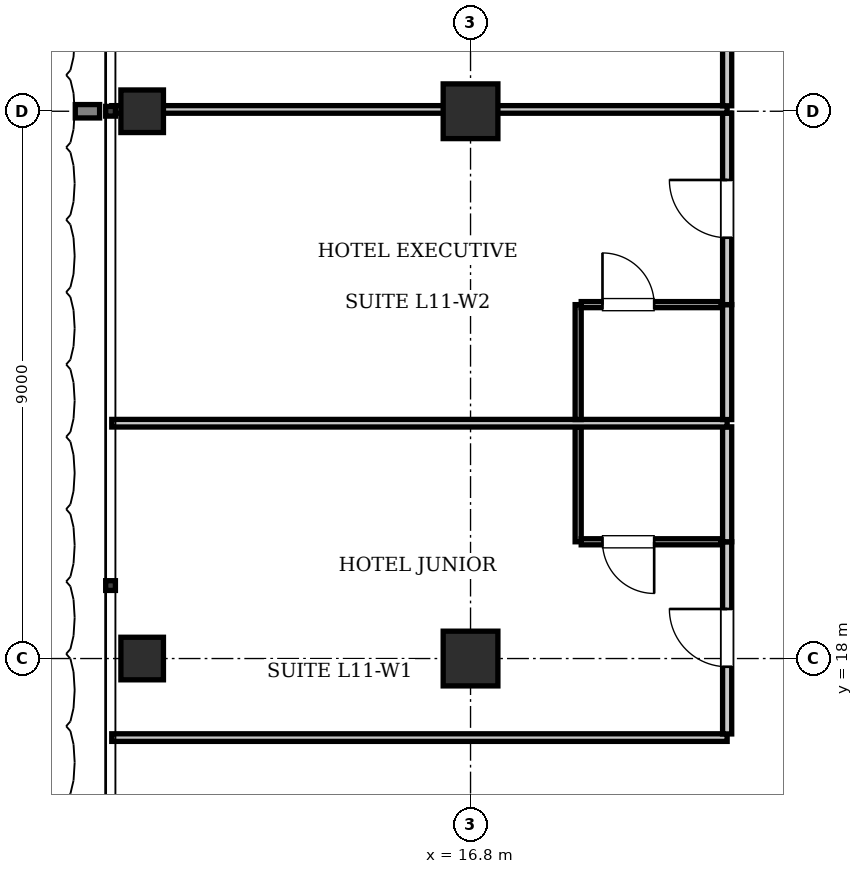
"""IFC4 building model, lengths in metres.
Left out: names, types, materials, properties, quantities, classifications, styles, units other than length and angle.
Written with IfcOpenShell. Run it as: python <this file> out.ifc"""

import sys

from ifc_helpers import new_model, si_unit, direction, frame, frame_2d, origin, origin_2d, place, context, subcontext, project, spatial, rectangle, i_section, extrude, element, fill, save


model = new_model("IFC4")
c1 = context("Model", 3, precision=1e-05, world=origin(), true_north=direction((0.0, 1.0)))
c2 = subcontext(c1, "Body", "Model", "MODEL_VIEW")
j1 = project(units=[si_unit("LENGTHUNIT", "METRE"), si_unit("PLANEANGLEUNIT", "RADIAN")], contexts=[c1])
p1 = place(None, origin())
s1 = spatial("IfcSite", under=j1, at=p1, CompositionType="ELEMENT")
p2 = place(p1, origin())
s2 = spatial("IfcBuilding", under=s1, at=p2, CompositionType="ELEMENT")
p3 = place(p2, frame((0.0, 0.0, 50.05)))
s3 = spatial("IfcBuildingStorey", under=s2, at=p3, CompositionType="ELEMENT", Elevation=50.05)
for number, where, z_axis, x_axis in (
    (1, (16.8, 18.0, 0.0), (0.0, 0.0, 1.0), (1.0, 0.0, 0.0)),
    (2, (16.8, 27.0, 0.0), (0.0, 0.0, 1.0), (1.0, 0.0, 0.0)),
):
    element("IfcColumn", number, at=place(p3, frame(where, z_axis=z_axis, x_axis=x_axis)), inside=s3, PredefinedType="COLUMN", context=c2, shape_type="SweptSolid", body=[
        extrude(rectangle(XDim=0.9, YDim=0.9, at=origin_2d()), origin(), (0.0, 0.0, 1.0), 3.85),
    ])
for number, where, z_axis, x_axis in (
    (3, (11.4, 18.0, 0.0), (0.0, 0.0, 1.0), (1.0, 0.0, 0.0)),
    (4, (11.4, 27.0, 0.0), (0.0, 0.0, 1.0), (1.0, 0.0, 0.0)),
):
    element("IfcColumn", number, at=place(p3, frame(where, z_axis=z_axis, x_axis=x_axis)), inside=s3, PredefinedType="COLUMN", context=c2, shape_type="SweptSolid", body=[
        extrude(i_section(OverallWidth=0.7, OverallDepth=0.7, WebThickness=0.028, FlangeThickness=0.044, at=origin_2d()), origin(), (0.0, 0.0, 1.0), 3.85),
    ])
p4 = place(p3, frame((10.9, 16.7, 0.0), z_axis=(0.0, 0.0, 1.0), x_axis=(1.0, 0.0, 0.0)))
e5 = element("IfcWall", 5, at=p4, inside=s3, PredefinedType="PARTITIONING", context=c2, shape_type="SweptSolid", body=[
    extrude(rectangle(XDim=10.12, YDim=0.125, at=frame_2d((5.06, 0.0))), origin(), (0.0, 0.0, 1.0), 3.61),
])
p5 = place(p3, frame((21.02, 16.76, 0.0), z_axis=(0.0, 0.0, 1.0), x_axis=(0.0, 1.0, 0.0)))
e6 = element("IfcWall", 6, at=p5, inside=s3, PredefinedType="PARTITIONING", context=c2, shape_type="SweptSolid", body=[
    extrude(rectangle(XDim=3.16, YDim=0.15, at=frame_2d((1.58, 0.0))), origin(), (0.0, 0.0, 1.0), 3.403),
])
p6 = place(p5, frame((1.105, 0.0, 0.0)))
e7 = element("IfcOpeningElement", 7, at=p6, cuts=e6, PredefinedType="OPENING", context=c2, shape_type="SweptSolid", body=[
    extrude(rectangle(XDim=0.95, YDim=2.15, at=frame_2d((0.475, 1.075))), frame((0.0, 0.085, 0.0), z_axis=(0.0, -1.0, 0.0), x_axis=(1.0, 0.0, 0.0)), (0.0, 0.0, 1.0), 0.17),
])
p7 = place(p3, frame((21.02, 19.92, 0.0), z_axis=(0.0, 0.0, 1.0), x_axis=(0.0, 1.0, 0.0)))
e8 = element("IfcWall", 8, at=p7, inside=s3, PredefinedType="PARTITIONING", context=c2, shape_type="SweptSolid", body=[
    extrude(rectangle(XDim=1.89, YDim=0.15, at=frame_2d((0.945, 0.0))), origin(), (0.0, 0.0, 1.0), 3.457),
])
p8 = place(p3, frame((18.57, 19.92, 0.0), z_axis=(0.0, 0.0, 1.0), x_axis=(0.0, 1.0, 0.0)))
e9 = element("IfcWall", 9, at=p8, inside=s3, PredefinedType="PARTITIONING", context=c2, shape_type="SweptSolid", body=[
    extrude(rectangle(XDim=1.89, YDim=0.1, at=frame_2d((0.945, 0.0))), origin(), (0.0, 0.0, 1.0), 3.61),
])
p9 = place(p3, frame((18.62, 19.92, 0.0), z_axis=(0.0, 0.0, 1.0), x_axis=(1.0, 0.0, 0.0)))
e10 = element("IfcWall", 10, at=p9, inside=s3, PredefinedType="PARTITIONING", context=c2, shape_type="SweptSolid", body=[
    extrude(rectangle(XDim=2.3, YDim=0.1, at=frame_2d((1.15, 0.0))), origin(), (0.0, 0.0, 1.0), 3.61),
])
p10 = place(p9, frame((0.35, 0.0, 0.0)))
e11 = element("IfcOpeningElement", 11, at=p10, cuts=e10, PredefinedType="OPENING", context=c2, shape_type="SweptSolid", body=[
    extrude(rectangle(XDim=0.85, YDim=2.1, at=frame_2d((0.425, 1.05))), frame((0.0, 0.06, 0.0), z_axis=(0.0, -1.0, 0.0), x_axis=(1.0, 0.0, 0.0)), (0.0, 0.0, 1.0), 0.12),
])
p11 = place(p3, frame((10.9, 21.87, 0.0), z_axis=(0.0, 0.0, 1.0), x_axis=(1.0, 0.0, 0.0)))
e12 = element("IfcWall", 12, at=p11, inside=s3, PredefinedType="PARTITIONING", context=c2, shape_type="SweptSolid", body=[
    extrude(rectangle(XDim=10.12, YDim=0.125, at=frame_2d((5.06, 0.0))), origin(), (0.0, 0.0, 1.0), 3.61),
])
p12 = place(p3, frame((21.02, 21.93, 0.0), z_axis=(0.0, 0.0, 1.0), x_axis=(0.0, 1.0, 0.0)))
e13 = element("IfcWall", 13, at=p12, inside=s3, PredefinedType="PARTITIONING", context=c2, shape_type="SweptSolid", body=[
    extrude(rectangle(XDim=1.89, YDim=0.15, at=frame_2d((0.945, 0.0))), origin(), (0.0, 0.0, 1.0), 3.457),
])
p13 = place(p3, frame((21.02, 23.82, 0.0), z_axis=(0.0, 0.0, 1.0), x_axis=(0.0, 1.0, 0.0)))
e14 = element("IfcWall", 14, at=p13, inside=s3, PredefinedType="PARTITIONING", context=c2, shape_type="SweptSolid", body=[
    extrude(rectangle(XDim=3.15, YDim=0.15, at=frame_2d((1.575, 0.0))), origin(), (0.0, 0.0, 1.0), 3.457),
])
p14 = place(p13, frame((1.1, 0.0, 0.0)))
e15 = element("IfcOpeningElement", 15, at=p14, cuts=e14, PredefinedType="OPENING", context=c2, shape_type="SweptSolid", body=[
    extrude(rectangle(XDim=0.95, YDim=2.15, at=frame_2d((0.475, 1.075))), frame((0.0, 0.085, 0.0), z_axis=(0.0, -1.0, 0.0), x_axis=(1.0, 0.0, 0.0)), (0.0, 0.0, 1.0), 0.17),
])
p15 = place(p3, frame((18.57, 21.93, 0.0), z_axis=(0.0, 0.0, 1.0), x_axis=(0.0, 1.0, 0.0)))
e16 = element("IfcWall", 16, at=p15, inside=s3, PredefinedType="PARTITIONING", context=c2, shape_type="SweptSolid", body=[
    extrude(rectangle(XDim=1.89, YDim=0.1, at=frame_2d((0.945, 0.0))), origin(), (0.0, 0.0, 1.0), 3.61),
])
p16 = place(p3, frame((18.62, 23.82, 0.0), z_axis=(0.0, 0.0, 1.0), x_axis=(1.0, 0.0, 0.0)))
e17 = element("IfcWall", 17, at=p16, inside=s3, PredefinedType="PARTITIONING", context=c2, shape_type="SweptSolid", body=[
    extrude(rectangle(XDim=2.3, YDim=0.1, at=frame_2d((1.15, 0.0))), origin(), (0.0, 0.0, 1.0), 3.61),
])
p17 = place(p16, frame((0.35, 0.0, 0.0)))
e18 = element("IfcOpeningElement", 18, at=p17, cuts=e17, PredefinedType="OPENING", context=c2, shape_type="SweptSolid", body=[
    extrude(rectangle(XDim=0.85, YDim=2.1, at=frame_2d((0.425, 1.05))), frame((0.0, 0.06, 0.0), z_axis=(0.0, -1.0, 0.0), x_axis=(1.0, 0.0, 0.0)), (0.0, 0.0, 1.0), 0.12),
])
p18 = place(p3, frame((10.9, 27.03, 0.0), z_axis=(0.0, 0.0, 1.0), x_axis=(1.0, 0.0, 0.0)))
e19 = element("IfcWall", 19, at=p18, inside=s3, PredefinedType="PARTITIONING", context=c2, shape_type="SweptSolid", body=[
    extrude(rectangle(XDim=10.12, YDim=0.125, at=frame_2d((5.06, 0.0))), origin(), (0.0, 0.0, 1.0), 2.988),
])
p19 = place(p3, frame((21.02, 27.09, 0.0), z_axis=(0.0, 0.0, 1.0), x_axis=(0.0, 1.0, 0.0)))
e20 = element("IfcWall", 20, at=p19, inside=s3, PredefinedType="PARTITIONING", context=c2, shape_type="SweptSolid", body=[
    extrude(rectangle(XDim=3.16, YDim=0.15, at=frame_2d((1.58, 0.0))), origin(), (0.0, 0.0, 1.0), 3.207),
])
p20 = place(p19, frame((1.105, 0.0, 0.0)))
e21 = element("IfcOpeningElement", 21, at=p20, cuts=e20, PredefinedType="OPENING", context=c2, shape_type="SweptSolid", body=[
    extrude(rectangle(XDim=0.95, YDim=2.15, at=frame_2d((0.475, 1.075))), frame((0.0, 0.085, 0.0), z_axis=(0.0, -1.0, 0.0), x_axis=(1.0, 0.0, 0.0)), (0.0, 0.0, 1.0), 0.17),
])
p21 = place(p10, frame((0.85, 0.0, 0.0), z_axis=(0.0, 0.0, 1.0), x_axis=(-1.0, 0.0, 0.0)))
e22 = element("IfcDoor", 22, at=p21, inside=s3, OperationType="SINGLE_SWING_LEFT", PredefinedType="DOOR", context=c2, shape_type="SweptSolid", body=[
    extrude(rectangle(XDim=0.85, YDim=2.1, at=frame_2d((0.425, 1.05))), frame((0.0, 0.025, 0.0), z_axis=(0.0, -1.0, 0.0), x_axis=(1.0, 0.0, 0.0)), (0.0, 0.0, 1.0), 0.05),
])
fill(e11, e22)
p22 = place(p6, origin())
e23 = element("IfcDoor", 23, at=p22, inside=s3, OperationType="SINGLE_SWING_RIGHT", PredefinedType="DOOR", context=c2, shape_type="SweptSolid", body=[
    extrude(rectangle(XDim=0.95, YDim=2.15, at=frame_2d((0.475, 1.075))), frame((0.0, 0.025, 0.0), z_axis=(0.0, -1.0, 0.0), x_axis=(1.0, 0.0, 0.0)), (0.0, 0.0, 1.0), 0.05),
])
fill(e7, e23)
p23 = place(p17, origin())
e24 = element("IfcDoor", 24, at=p23, inside=s3, OperationType="SINGLE_SWING_LEFT", PredefinedType="DOOR", context=c2, shape_type="SweptSolid", body=[
    extrude(rectangle(XDim=0.85, YDim=2.1, at=frame_2d((0.425, 1.05))), frame((0.0, 0.025, 0.0), z_axis=(0.0, -1.0, 0.0), x_axis=(1.0, 0.0, 0.0)), (0.0, 0.0, 1.0), 0.05),
])
fill(e18, e24)
p24 = place(p14, origin())
e25 = element("IfcDoor", 25, at=p24, inside=s3, OperationType="SINGLE_SWING_RIGHT", PredefinedType="DOOR", context=c2, shape_type="SweptSolid", body=[
    extrude(rectangle(XDim=0.95, YDim=2.15, at=frame_2d((0.475, 1.075))), frame((0.0, 0.025, 0.0), z_axis=(0.0, -1.0, 0.0), x_axis=(1.0, 0.0, 0.0)), (0.0, 0.0, 1.0), 0.05),
])
fill(e15, e25)
save(model, sys.argv[1])
